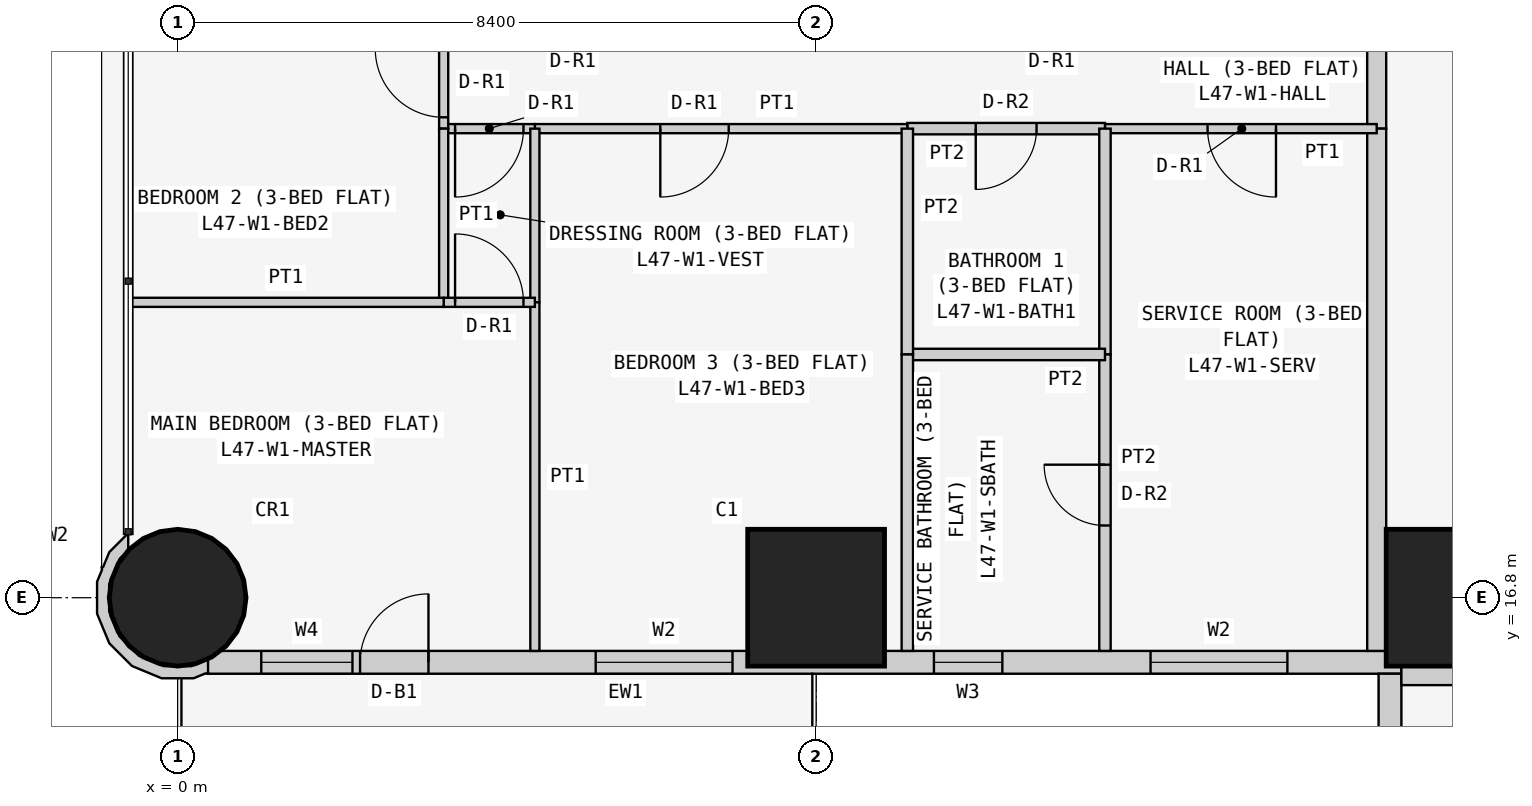
"""IFC4 building model, lengths in metres.
Left out: names, types, materials, properties, quantities, classifications, styles, units other than length and angle.
Written with IfcOpenShell. Run it as: python <this file> out.ifc"""

import sys

from ifc_helpers import new_model, si_unit, direction, frame, frame_2d, origin, origin_2d, place, context, subcontext, project, spatial, polyline, rectangle, circle, outline, extrude, element, fill, save


model = new_model("IFC4")
c1 = context("Model", 3, precision=1e-05, world=origin(), true_north=direction((0.0, 1.0)))
c2 = subcontext(c1, "Body", "Model", "MODEL_VIEW")
j1 = project(units=[si_unit("LENGTHUNIT", "METRE"), si_unit("PLANEANGLEUNIT", "RADIAN")], contexts=[c1])
p1 = place(None, origin())
s1 = spatial("IfcSite", under=j1, at=p1, CompositionType="ELEMENT")
p2 = place(p1, origin())
s2 = spatial("IfcBuilding", under=s1, at=p2, CompositionType="ELEMENT")
p3 = place(p2, frame((0.0, 0.0, 183.3)))
s3 = spatial("IfcBuildingStorey", under=s2, at=p3, CompositionType="ELEMENT", Elevation=183.3)
p4 = place(p3, frame((0.0, 16.8, 0.0), z_axis=(0.0, 0.0, 1.0), x_axis=(1.0, 0.0, 0.0)))
e1 = element("IfcColumn", 1, at=p4, inside=s3, PredefinedType="COLUMN", context=c2, shape_type="SweptSolid", body=[
    extrude(circle(Radius=0.9, at=origin_2d()), origin(), (0.0, 0.0, 1.0), 3.6),
])
for number, where, z_axis, x_axis in (
    (2, (8.4, 16.8, 0.0), (0.0, 0.0, 1.0), (1.0, 0.0, 0.0)),
    (3, (16.8, 16.8, 0.0), (0.0, 0.0, 1.0), (1.0, 0.0, 0.0)),
):
    element("IfcColumn", number, at=place(p3, frame(where, z_axis=z_axis, x_axis=x_axis)), inside=s3, PredefinedType="COLUMN", context=c2, shape_type="SweptSolid", body=[
        extrude(rectangle(XDim=1.8, YDim=1.8, at=origin_2d()), origin(), (0.0, 0.0, 1.0), 3.6),
    ])
p5 = place(p3, frame((0.4, 15.95, 0.0), z_axis=(0.0, 0.0, 1.0), x_axis=(1.0, 0.0, 0.0)))
e4 = element("IfcWall", 4, at=p5, inside=s3, PredefinedType="SOLIDWALL", context=c2, shape_type="SweptSolid", body=[
    extrude(rectangle(XDim=15.7, YDim=0.3, at=frame_2d((7.85, 0.0))), origin(), (0.0, 0.0, 1.0), 3.45),
])
p6 = place(p5, frame((12.4, 0.0, 0.9)))
e5 = element("IfcOpeningElement", 5, at=p6, cuts=e4, PredefinedType="OPENING", context=c2, shape_type="SweptSolid", body=[
    extrude(rectangle(XDim=1.8, YDim=1.5, at=frame_2d((0.9, 0.75))), frame((0.0, 0.16, 0.0), z_axis=(0.0, -1.0, 0.0), x_axis=(1.0, 0.0, 0.0)), (0.0, 0.0, 1.0), 0.32),
])
p7 = place(p5, frame((9.55, 0.0, 1.5)))
e6 = element("IfcOpeningElement", 6, at=p7, cuts=e4, PredefinedType="OPENING", context=c2, shape_type="SweptSolid", body=[
    extrude(rectangle(XDim=0.9, YDim=0.7, at=frame_2d((0.45, 0.35))), frame((0.0, 0.16, 0.0), z_axis=(0.0, -1.0, 0.0), x_axis=(1.0, 0.0, 0.0)), (0.0, 0.0, 1.0), 0.32),
])
p8 = place(p5, frame((5.1, 0.0, 0.9)))
e7 = element("IfcOpeningElement", 7, at=p8, cuts=e4, PredefinedType="OPENING", context=c2, shape_type="SweptSolid", body=[
    extrude(rectangle(XDim=1.8, YDim=1.5, at=frame_2d((0.9, 0.75))), frame((0.0, 0.16, 0.0), z_axis=(0.0, -1.0, 0.0), x_axis=(1.0, 0.0, 0.0)), (0.0, 0.0, 1.0), 0.32),
])
p9 = place(p5, frame((2.0, 0.0, 0.0)))
e8 = element("IfcOpeningElement", 8, at=p9, cuts=e4, PredefinedType="OPENING", context=c2, shape_type="SweptSolid", body=[
    extrude(rectangle(XDim=0.9, YDim=2.4, at=frame_2d((0.45, 1.2))), frame((0.0, 0.16, 0.0), z_axis=(0.0, -1.0, 0.0), x_axis=(1.0, 0.0, 0.0)), (0.0, 0.0, 1.0), 0.32),
])
p10 = place(p5, frame((0.7, 0.0, 0.9)))
e9 = element("IfcOpeningElement", 9, at=p10, cuts=e4, PredefinedType="OPENING", context=c2, shape_type="SweptSolid", body=[
    extrude(rectangle(XDim=1.2, YDim=1.5, at=frame_2d((0.6, 0.75))), frame((0.0, 0.16, 0.0), z_axis=(0.0, -1.0, 0.0), x_axis=(1.0, 0.0, 0.0)), (0.0, 0.0, 1.0), 0.32),
])
p11 = place(p3, frame((15.95, 15.8, 0.0), z_axis=(0.0, 0.0, 1.0), x_axis=(0.0, -1.0, 0.0)))
e10 = element("IfcWall", 10, at=p11, inside=s3, PredefinedType="SOLIDWALL", context=c2, shape_type="SweptSolid", body=[
    extrude(rectangle(XDim=7.0, YDim=0.3, at=frame_2d((3.5, 0.0))), origin(), (0.0, 0.0, 1.0), 3.45),
])
p12 = place(p11, frame((1.5, 0.0, 0.9)))
e11 = element("IfcOpeningElement", 11, at=p12, cuts=e10, PredefinedType="OPENING", context=c2, shape_type="SweptSolid", body=[
    extrude(rectangle(XDim=2.4, YDim=1.5, at=frame_2d((1.2, 0.75))), frame((0.0, 0.16, 0.0), z_axis=(0.0, -1.0, 0.0), x_axis=(1.0, 0.0, 0.0)), (0.0, 0.0, 1.0), 0.32),
])
p13 = place(p11, frame((5.05, 0.0, 0.9)))
e12 = element("IfcOpeningElement", 12, at=p13, cuts=e10, PredefinedType="OPENING", context=c2, shape_type="SweptSolid", body=[
    extrude(rectangle(XDim=1.2, YDim=1.5, at=frame_2d((0.6, 0.75))), frame((0.0, 0.16, 0.0), z_axis=(0.0, -1.0, 0.0), x_axis=(1.0, 0.0, 0.0)), (0.0, 0.0, 1.0), 0.32),
])
p14 = place(p3, frame((-0.611, 17.567, 0.0), z_axis=(0.0, 0.0, 1.0), x_axis=(-0.926129809145, -0.377204953059, 0.0)))
e13 = element("IfcWall", 13, at=p14, inside=s3, PredefinedType="SOLIDWALL", context=c2, shape_type="SweptSolid", body=[
    extrude(outline(polyline([(-0.269, 2.017), (-0.37, 1.841), (-0.102, 1.842), (0.23, 1.707), (0.485, 1.455), (0.624, 1.125), (0.626, 0.766), (0.49, 0.434), (0.239, 0.179), (0.09, 0.117), (0.011, -0.078), (0.024, -0.083), (0.33, 0.045), (0.48, 0.197), (0.499, 0.193), (0.508, 0.225), (0.626, 0.345), (0.785, 0.736), (0.782, 1.157), (0.619, 1.546), (0.319, 1.842), (-0.072, 2.001), (-0.24, 2.0), (-0.269, 2.017)])), origin(), (0.0, 0.0, 1.0), 3.45),
])
p15 = place(p3, frame((22.971, 15.775, 0.0), z_axis=(0.0, 0.0, 1.0), x_axis=(-1.0, 0.0, 0.0)))
e14 = element("IfcWall", 14, at=p15, inside=s3, PredefinedType="PARTITIONING", context=c2, shape_type="SweptSolid", body=[
    extrude(rectangle(XDim=6.871, YDim=0.25, at=frame_2d((3.436, 0.0))), origin(), (0.0, 0.0, 1.0), 3.45),
])
p16 = place(p3, frame((15.775, 22.971, 0.0), z_axis=(0.0, 0.0, 1.0), x_axis=(0.0, 1.0, 0.0)))
e15 = element("IfcWall", 15, at=p16, inside=s3, PredefinedType="PARTITIONING", context=c2, shape_type="SweptSolid", body=[
    extrude(rectangle(XDim=1.2, YDim=0.25, at=frame_2d((0.6, 0.0))), origin(), (0.0, 0.0, 1.0), 3.45),
])
p17 = place(p3, frame((15.775, 16.1, 0.0), z_axis=(0.0, 0.0, 1.0), x_axis=(0.0, 1.0, 0.0)))
e16 = element("IfcWall", 16, at=p17, inside=s3, PredefinedType="PARTITIONING", context=c2, shape_type="SweptSolid", body=[
    extrude(rectangle(XDim=6.871, YDim=0.25, at=frame_2d((3.436, 0.0))), origin(), (0.0, 0.0, 1.0), 3.45),
])
p18 = place(p3, frame((12.2, 22.971, 0.0), z_axis=(0.0, 0.0, 1.0), x_axis=(1.0, 0.0, 0.0)))
e17 = element("IfcWall", 17, at=p18, inside=s3, PredefinedType="PARTITIONING", context=c2, shape_type="SweptSolid", body=[
    extrude(rectangle(XDim=3.575, YDim=0.12, at=frame_2d((1.788, 0.0))), origin(), (0.0, 0.0, 1.0), 3.45),
])
p19 = place(p18, frame((1.35, 0.0, 0.0)))
e18 = element("IfcOpeningElement", 18, at=p19, cuts=e17, PredefinedType="OPENING", context=c2, shape_type="SweptSolid", body=[
    extrude(rectangle(XDim=0.9, YDim=2.1, at=frame_2d((0.45, 1.05))), frame((0.0, 0.07, 0.0), z_axis=(0.0, -1.0, 0.0), x_axis=(1.0, 0.0, 0.0)), (0.0, 0.0, 1.0), 0.14),
])
p20 = place(p3, frame((9.6, 22.971, 0.0), z_axis=(0.0, 0.0, 1.0), x_axis=(1.0, 0.0, 0.0)))
e19 = element("IfcWall", 19, at=p20, inside=s3, PredefinedType="PARTITIONING", context=c2, shape_type="SweptSolid", body=[
    extrude(rectangle(XDim=2.6, YDim=0.15, at=frame_2d((1.3, 0.0))), origin(), (0.0, 0.0, 1.0), 3.45),
])
p21 = place(p20, frame((0.9, 0.0, 0.0)))
e20 = element("IfcOpeningElement", 20, at=p21, cuts=e19, PredefinedType="OPENING", context=c2, shape_type="SweptSolid", body=[
    extrude(rectangle(XDim=0.8, YDim=2.1, at=frame_2d((0.4, 1.05))), frame((0.0, 0.085, 0.0), z_axis=(0.0, -1.0, 0.0), x_axis=(1.0, 0.0, 0.0)), (0.0, 0.0, 1.0), 0.17),
])
p22 = place(p3, frame((4.7, 22.971, 0.0), z_axis=(0.0, 0.0, 1.0), x_axis=(1.0, 0.0, 0.0)))
e21 = element("IfcWall", 21, at=p22, inside=s3, PredefinedType="PARTITIONING", context=c2, shape_type="SweptSolid", body=[
    extrude(rectangle(XDim=4.9, YDim=0.12, at=frame_2d((2.45, 0.0))), origin(), (0.0, 0.0, 1.0), 3.45),
])
p23 = place(p22, frame((1.65, 0.0, 0.0)))
e22 = element("IfcOpeningElement", 22, at=p23, cuts=e21, PredefinedType="OPENING", context=c2, shape_type="SweptSolid", body=[
    extrude(rectangle(XDim=0.9, YDim=2.1, at=frame_2d((0.45, 1.05))), frame((0.0, 0.07, 0.0), z_axis=(0.0, -1.0, 0.0), x_axis=(1.0, 0.0, 0.0)), (0.0, 0.0, 1.0), 0.14),
])
p24 = place(p3, frame((3.5, 22.971, 0.0), z_axis=(0.0, 0.0, 1.0), x_axis=(1.0, 0.0, 0.0)))
e23 = element("IfcWall", 23, at=p24, inside=s3, PredefinedType="PARTITIONING", context=c2, shape_type="SweptSolid", body=[
    extrude(rectangle(XDim=1.2, YDim=0.12, at=frame_2d((0.6, 0.0))), origin(), (0.0, 0.0, 1.0), 3.45),
])
p25 = place(p24, frame((0.15, 0.0, 0.0)))
e24 = element("IfcOpeningElement", 24, at=p25, cuts=e23, PredefinedType="OPENING", context=c2, shape_type="SweptSolid", body=[
    extrude(rectangle(XDim=0.9, YDim=2.1, at=frame_2d((0.45, 1.05))), frame((0.0, 0.07, 0.0), z_axis=(0.0, -1.0, 0.0), x_axis=(1.0, 0.0, 0.0)), (0.0, 0.0, 1.0), 0.14),
])
p26 = place(p3, frame((3.5, 24.171, 0.0), z_axis=(0.0, 0.0, 1.0), x_axis=(0.0, -1.0, 0.0)))
e25 = element("IfcWall", 25, at=p26, inside=s3, PredefinedType="PARTITIONING", context=c2, shape_type="SweptSolid", body=[
    extrude(rectangle(XDim=1.2, YDim=0.12, at=frame_2d((0.6, 0.0))), origin(), (0.0, 0.0, 1.0), 3.45),
])
p27 = place(p26, frame((0.151, 0.0, 0.0)))
e26 = element("IfcOpeningElement", 26, at=p27, cuts=e25, PredefinedType="OPENING", context=c2, shape_type="SweptSolid", body=[
    extrude(rectangle(XDim=0.9, YDim=2.1, at=frame_2d((0.45, 1.05))), frame((0.0, 0.07, 0.0), z_axis=(0.0, -1.0, 0.0), x_axis=(1.0, 0.0, 0.0)), (0.0, 0.0, 1.0), 0.14),
])
p28 = place(p3, frame((12.2, 22.971, 0.0), z_axis=(0.0, 0.0, 1.0), x_axis=(0.0, -1.0, 0.0)))
e27 = element("IfcWall", 27, at=p28, inside=s3, PredefinedType="PARTITIONING", context=c2, shape_type="SweptSolid", body=[
    extrude(rectangle(XDim=2.971, YDim=0.15, at=frame_2d((1.485, 0.0))), origin(), (0.0, 0.0, 1.0), 3.45),
])
p29 = place(p3, frame((12.2, 20.0, 0.0), z_axis=(0.0, 0.0, 1.0), x_axis=(0.0, -1.0, 0.0)))
e28 = element("IfcWall", 28, at=p29, inside=s3, PredefinedType="PARTITIONING", context=c2, shape_type="SweptSolid", body=[
    extrude(rectangle(XDim=3.9, YDim=0.15, at=frame_2d((1.95, 0.0))), origin(), (0.0, 0.0, 1.0), 3.45),
])
p30 = place(p29, frame((1.45, 0.0, 0.0)))
e29 = element("IfcOpeningElement", 29, at=p30, cuts=e28, PredefinedType="OPENING", context=c2, shape_type="SweptSolid", body=[
    extrude(rectangle(XDim=0.8, YDim=2.1, at=frame_2d((0.4, 1.05))), frame((0.0, 0.085, 0.0), z_axis=(0.0, -1.0, 0.0), x_axis=(1.0, 0.0, 0.0)), (0.0, 0.0, 1.0), 0.17),
])
p31 = place(p3, frame((9.6, 20.0, 0.0), z_axis=(0.0, 0.0, 1.0), x_axis=(1.0, 0.0, 0.0)))
e30 = element("IfcWall", 30, at=p31, inside=s3, PredefinedType="PARTITIONING", context=c2, shape_type="SweptSolid", body=[
    extrude(rectangle(XDim=2.6, YDim=0.15, at=frame_2d((1.3, 0.0))), origin(), (0.0, 0.0, 1.0), 3.45),
])
p32 = place(p3, frame((9.6, 22.971, 0.0), z_axis=(0.0, 0.0, 1.0), x_axis=(0.0, -1.0, 0.0)))
e31 = element("IfcWall", 31, at=p32, inside=s3, PredefinedType="PARTITIONING", context=c2, shape_type="SweptSolid", body=[
    extrude(rectangle(XDim=2.971, YDim=0.15, at=frame_2d((1.485, 0.0))), origin(), (0.0, 0.0, 1.0), 3.45),
])
p33 = place(p3, frame((9.6, 20.0, 0.0), z_axis=(0.0, 0.0, 1.0), x_axis=(0.0, -1.0, 0.0)))
e32 = element("IfcWall", 32, at=p33, inside=s3, PredefinedType="PARTITIONING", context=c2, shape_type="SweptSolid", body=[
    extrude(rectangle(XDim=3.9, YDim=0.15, at=frame_2d((1.95, 0.0))), origin(), (0.0, 0.0, 1.0), 3.45),
])
p34 = place(p3, frame((4.7, 22.971, 0.0), z_axis=(0.0, 0.0, 1.0), x_axis=(0.0, -1.0, 0.0)))
e33 = element("IfcWall", 33, at=p34, inside=s3, PredefinedType="PARTITIONING", context=c2, shape_type="SweptSolid", body=[
    extrude(rectangle(XDim=2.285, YDim=0.12, at=frame_2d((1.143, 0.0))), origin(), (0.0, 0.0, 1.0), 3.45),
])
p35 = place(p3, frame((4.7, 20.686, 0.0), z_axis=(0.0, 0.0, 1.0), x_axis=(0.0, -1.0, 0.0)))
e34 = element("IfcWall", 34, at=p35, inside=s3, PredefinedType="PARTITIONING", context=c2, shape_type="SweptSolid", body=[
    extrude(rectangle(XDim=4.586, YDim=0.12, at=frame_2d((2.293, 0.0))), origin(), (0.0, 0.0, 1.0), 3.45),
])
p36 = place(p3, frame((3.5, 22.971, 0.0), z_axis=(0.0, 0.0, 1.0), x_axis=(0.0, -1.0, 0.0)))
e35 = element("IfcWall", 35, at=p36, inside=s3, PredefinedType="PARTITIONING", context=c2, shape_type="SweptSolid", body=[
    extrude(rectangle(XDim=2.285, YDim=0.12, at=frame_2d((1.143, 0.0))), origin(), (0.0, 0.0, 1.0), 3.45),
])
p37 = place(p3, frame((3.5, 20.686, 0.0), z_axis=(0.0, 0.0, 1.0), x_axis=(1.0, 0.0, 0.0)))
e36 = element("IfcWall", 36, at=p37, inside=s3, PredefinedType="PARTITIONING", context=c2, shape_type="SweptSolid", body=[
    extrude(rectangle(XDim=1.2, YDim=0.12, at=frame_2d((0.6, 0.0))), origin(), (0.0, 0.0, 1.0), 3.45),
])
p38 = place(p37, frame((0.15, 0.0, 0.0)))
e37 = element("IfcOpeningElement", 37, at=p38, cuts=e36, PredefinedType="OPENING", context=c2, shape_type="SweptSolid", body=[
    extrude(rectangle(XDim=0.9, YDim=2.1, at=frame_2d((0.45, 1.05))), frame((0.0, 0.07, 0.0), z_axis=(0.0, -1.0, 0.0), x_axis=(1.0, 0.0, 0.0)), (0.0, 0.0, 1.0), 0.14),
])
p39 = place(p3, frame((-0.65, 20.686, 0.0), z_axis=(0.0, 0.0, 1.0), x_axis=(1.0, 0.0, 0.0)))
e38 = element("IfcWall", 38, at=p39, inside=s3, PredefinedType="PARTITIONING", context=c2, shape_type="SweptSolid", body=[
    extrude(rectangle(XDim=4.15, YDim=0.12, at=frame_2d((2.075, 0.0))), origin(), (0.0, 0.0, 1.0), 3.45),
])
p40 = place(p6, origin())
e39 = element("IfcWindow", 39, at=p40, inside=s3, PartitioningType="SINGLE_PANEL", PredefinedType="WINDOW", context=c2, shape_type="SweptSolid", body=[
    extrude(rectangle(XDim=1.8, YDim=1.5, at=frame_2d((0.9, 0.75))), frame((0.0, 0.03, 0.0), z_axis=(0.0, -1.0, 0.0), x_axis=(1.0, 0.0, 0.0)), (0.0, 0.0, 1.0), 0.06),
])
fill(e5, e39)
p41 = place(p7, origin())
e40 = element("IfcWindow", 40, at=p41, inside=s3, PartitioningType="SINGLE_PANEL", PredefinedType="WINDOW", context=c2, shape_type="SweptSolid", body=[
    extrude(rectangle(XDim=0.9, YDim=0.7, at=frame_2d((0.45, 0.35))), frame((0.0, 0.03, 0.0), z_axis=(0.0, -1.0, 0.0), x_axis=(1.0, 0.0, 0.0)), (0.0, 0.0, 1.0), 0.06),
])
fill(e6, e40)
p42 = place(p8, origin())
e41 = element("IfcWindow", 41, at=p42, inside=s3, PartitioningType="SINGLE_PANEL", PredefinedType="WINDOW", context=c2, shape_type="SweptSolid", body=[
    extrude(rectangle(XDim=1.8, YDim=1.5, at=frame_2d((0.9, 0.75))), frame((0.0, 0.03, 0.0), z_axis=(0.0, -1.0, 0.0), x_axis=(1.0, 0.0, 0.0)), (0.0, 0.0, 1.0), 0.06),
])
fill(e7, e41)
p43 = place(p9, origin())
e42 = element("IfcDoor", 42, at=p43, inside=s3, OperationType="SINGLE_SWING_RIGHT", PredefinedType="DOOR", context=c2, shape_type="SweptSolid", body=[
    extrude(rectangle(XDim=0.9, YDim=2.4, at=frame_2d((0.45, 1.2))), frame((0.0, 0.025, 0.0), z_axis=(0.0, -1.0, 0.0), x_axis=(1.0, 0.0, 0.0)), (0.0, 0.0, 1.0), 0.05),
])
fill(e8, e42)
p44 = place(p10, origin())
e43 = element("IfcWindow", 43, at=p44, inside=s3, PartitioningType="SINGLE_PANEL", PredefinedType="WINDOW", context=c2, shape_type="SweptSolid", body=[
    extrude(rectangle(XDim=1.2, YDim=1.5, at=frame_2d((0.6, 0.75))), frame((0.0, 0.03, 0.0), z_axis=(0.0, -1.0, 0.0), x_axis=(1.0, 0.0, 0.0)), (0.0, 0.0, 1.0), 0.06),
])
fill(e9, e43)
p45 = place(p19, frame((0.9, 0.0, 0.0), z_axis=(0.0, 0.0, 1.0), x_axis=(-1.0, 0.0, 0.0)))
e44 = element("IfcDoor", 44, at=p45, inside=s3, OperationType="SINGLE_SWING_LEFT", PredefinedType="DOOR", context=c2, shape_type="SweptSolid", body=[
    extrude(rectangle(XDim=0.9, YDim=2.1, at=frame_2d((0.45, 1.05))), frame((0.0, 0.025, 0.0), z_axis=(0.0, -1.0, 0.0), x_axis=(1.0, 0.0, 0.0)), (0.0, 0.0, 1.0), 0.05),
])
fill(e18, e44)
p46 = place(p30, frame((0.8, 0.0, 0.0), z_axis=(0.0, 0.0, 1.0), x_axis=(-1.0, 0.0, 0.0)))
e45 = element("IfcDoor", 45, at=p46, inside=s3, OperationType="SINGLE_SWING_RIGHT", PredefinedType="DOOR", context=c2, shape_type="SweptSolid", body=[
    extrude(rectangle(XDim=0.8, YDim=2.1, at=frame_2d((0.4, 1.05))), frame((0.0, 0.025, 0.0), z_axis=(0.0, -1.0, 0.0), x_axis=(1.0, 0.0, 0.0)), (0.0, 0.0, 1.0), 0.05),
])
fill(e29, e45)
p47 = place(p21, frame((0.8, 0.0, 0.0), z_axis=(0.0, 0.0, 1.0), x_axis=(-1.0, 0.0, 0.0)))
e46 = element("IfcDoor", 46, at=p47, inside=s3, OperationType="SINGLE_SWING_RIGHT", PredefinedType="DOOR", context=c2, shape_type="SweptSolid", body=[
    extrude(rectangle(XDim=0.8, YDim=2.1, at=frame_2d((0.4, 1.05))), frame((0.0, 0.025, 0.0), z_axis=(0.0, -1.0, 0.0), x_axis=(1.0, 0.0, 0.0)), (0.0, 0.0, 1.0), 0.05),
])
fill(e20, e46)
p48 = place(p23, frame((0.9, 0.0, 0.0), z_axis=(0.0, 0.0, 1.0), x_axis=(-1.0, 0.0, 0.0)))
e47 = element("IfcDoor", 47, at=p48, inside=s3, OperationType="SINGLE_SWING_RIGHT", PredefinedType="DOOR", context=c2, shape_type="SweptSolid", body=[
    extrude(rectangle(XDim=0.9, YDim=2.1, at=frame_2d((0.45, 1.05))), frame((0.0, 0.025, 0.0), z_axis=(0.0, -1.0, 0.0), x_axis=(1.0, 0.0, 0.0)), (0.0, 0.0, 1.0), 0.05),
])
fill(e22, e47)
p49 = place(p25, frame((0.9, 0.0, 0.0), z_axis=(0.0, 0.0, 1.0), x_axis=(-1.0, 0.0, 0.0)))
e48 = element("IfcDoor", 48, at=p49, inside=s3, OperationType="SINGLE_SWING_RIGHT", PredefinedType="DOOR", context=c2, shape_type="SweptSolid", body=[
    extrude(rectangle(XDim=0.9, YDim=2.1, at=frame_2d((0.45, 1.05))), frame((0.0, 0.025, 0.0), z_axis=(0.0, -1.0, 0.0), x_axis=(1.0, 0.0, 0.0)), (0.0, 0.0, 1.0), 0.05),
])
fill(e24, e48)
p50 = place(p38, origin())
e49 = element("IfcDoor", 49, at=p50, inside=s3, OperationType="SINGLE_SWING_LEFT", PredefinedType="DOOR", context=c2, shape_type="SweptSolid", body=[
    extrude(rectangle(XDim=0.9, YDim=2.1, at=frame_2d((0.45, 1.05))), frame((0.0, 0.025, 0.0), z_axis=(0.0, -1.0, 0.0), x_axis=(1.0, 0.0, 0.0)), (0.0, 0.0, 1.0), 0.05),
])
fill(e37, e49)
p51 = place(p27, frame((0.9, 0.0, 0.0), z_axis=(0.0, 0.0, 1.0), x_axis=(-1.0, 0.0, 0.0)))
e50 = element("IfcDoor", 50, at=p51, inside=s3, OperationType="SINGLE_SWING_RIGHT", PredefinedType="DOOR", context=c2, shape_type="SweptSolid", body=[
    extrude(rectangle(XDim=0.9, YDim=2.1, at=frame_2d((0.45, 1.05))), frame((0.0, 0.025, 0.0), z_axis=(0.0, -1.0, 0.0), x_axis=(1.0, 0.0, 0.0)), (0.0, 0.0, 1.0), 0.05),
])
fill(e26, e50)
save(model, sys.argv[1])
